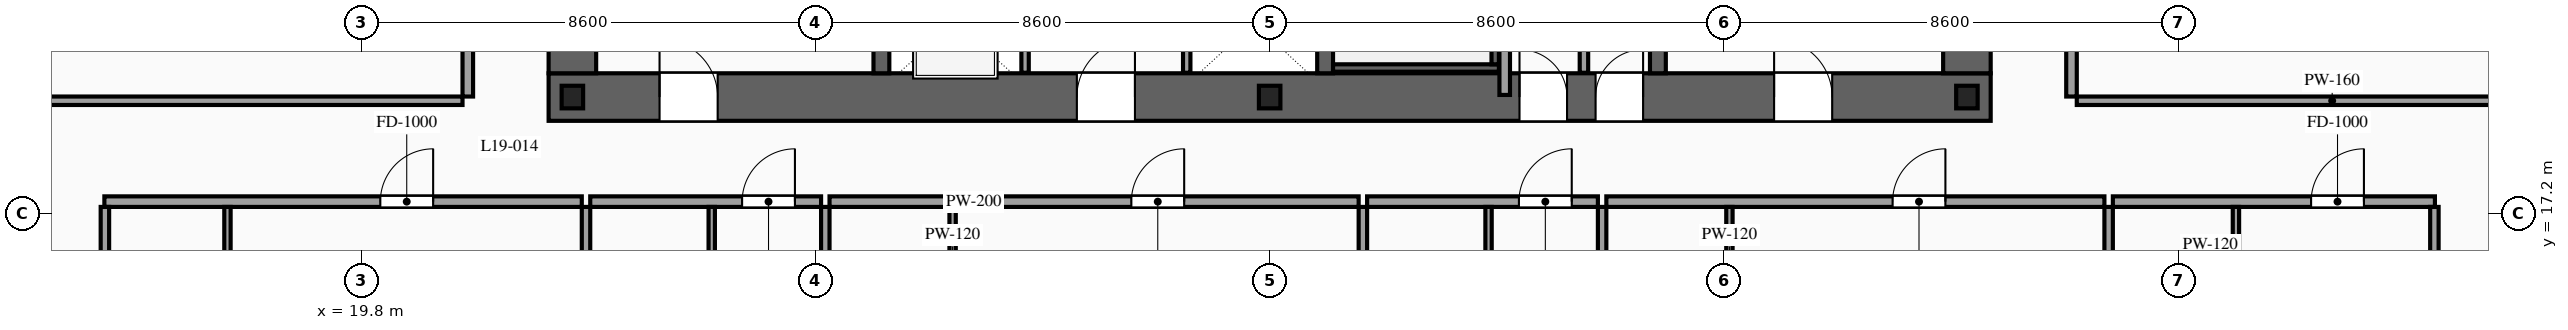
"""IFC4 building model, lengths in metres.
Left out: names, types, materials, properties, quantities, classifications, styles, units other than length and angle.
Written with IfcOpenShell. Run it as: python <this file> out.ifc"""

import sys

from ifc_helpers import new_model, si_unit, direction, frame, frame_2d, origin, origin_2d, place, context, subcontext, project, spatial, rectangle, i_section, extrude, source, transform, mapped, element, fill, save


model = new_model("IFC4")
c1 = context("Model", 3, precision=1e-05, world=origin(), true_north=direction((0.0, 1.0)))
c2 = subcontext(c1, "Body", "Model", "MODEL_VIEW")
j1 = project(units=[si_unit("LENGTHUNIT", "METRE"), si_unit("PLANEANGLEUNIT", "RADIAN")], contexts=[c1])
p1 = place(None, origin())
s1 = spatial("IfcSite", under=j1, at=p1, CompositionType="ELEMENT")
p2 = place(p1, origin())
s2 = spatial("IfcBuilding", under=s1, at=p2, CompositionType="ELEMENT")
p3 = place(p2, frame((0.0, 0.0, 74.8)))
s3 = spatial("IfcBuildingStorey", under=s2, at=p3, CompositionType="ELEMENT", Elevation=74.8)
p4 = place(p3, frame((23.35, 19.4, 0.0), z_axis=(0.0, 0.0, 1.0), x_axis=(1.0, 0.0, 0.0)))
e1 = element("IfcWall", 1, at=p4, inside=s3, PredefinedType="SHEAR", context=c2, shape_type="SweptSolid", body=[
    extrude(rectangle(XDim=27.3, YDim=0.9, at=frame_2d((13.65, 0.0))), origin(), (0.0, 0.0, 1.0), 3.6),
])
p5 = place(p4, frame((2.1, 0.0, 0.0)))
e2 = element("IfcOpeningElement", 2, at=p5, cuts=e1, PredefinedType="OPENING", context=c2, shape_type="SweptSolid", body=[
    extrude(rectangle(XDim=1.1, YDim=2.2, at=frame_2d((0.55, 1.1))), frame((0.0, 0.465, 0.0), z_axis=(0.0, -1.0, 0.0), x_axis=(1.0, 0.0, 0.0)), (0.0, 0.0, 1.0), 0.93),
])
p6 = place(p4, frame((10.0, 0.0, 0.0)))
e3 = element("IfcOpeningElement", 3, at=p6, cuts=e1, PredefinedType="OPENING", context=c2, shape_type="SweptSolid", body=[
    extrude(rectangle(XDim=1.1, YDim=2.2, at=frame_2d((0.55, 1.1))), frame((0.0, 0.465, 0.0), z_axis=(0.0, -1.0, 0.0), x_axis=(1.0, 0.0, 0.0)), (0.0, 0.0, 1.0), 0.93),
])
p7 = place(p4, frame((23.2, 0.0, 0.0)))
e4 = element("IfcOpeningElement", 4, at=p7, cuts=e1, PredefinedType="OPENING", context=c2, shape_type="SweptSolid", body=[
    extrude(rectangle(XDim=1.1, YDim=2.2, at=frame_2d((0.55, 1.1))), frame((0.0, 0.465, 0.0), z_axis=(0.0, -1.0, 0.0), x_axis=(1.0, 0.0, 0.0)), (0.0, 0.0, 1.0), 0.93),
])
p8 = place(p4, frame((19.82, 0.0, 0.0)))
e5 = element("IfcOpeningElement", 5, at=p8, cuts=e1, PredefinedType="OPENING", context=c2, shape_type="SweptSolid", body=[
    extrude(rectangle(XDim=0.9, YDim=2.15, at=frame_2d((0.45, 1.075))), frame((0.0, 0.465, 0.0), z_axis=(0.0, -1.0, 0.0), x_axis=(1.0, 0.0, 0.0)), (0.0, 0.0, 1.0), 0.93),
])
p9 = place(p4, frame((18.38, 0.0, 0.0)))
e6 = element("IfcOpeningElement", 6, at=p9, cuts=e1, PredefinedType="OPENING", context=c2, shape_type="SweptSolid", body=[
    extrude(rectangle(XDim=0.9, YDim=2.15, at=frame_2d((0.45, 1.075))), frame((0.0, 0.465, 0.0), z_axis=(0.0, -1.0, 0.0), x_axis=(1.0, 0.0, 0.0)), (0.0, 0.0, 1.0), 0.93),
])
m1 = source(origin(), c2, "Body", "SweptSolid", [
    extrude(rectangle(XDim=11.9, YDim=0.9, at=frame_2d((5.95, 0.0))), origin(), (0.0, 0.0, 1.0), 3.6),
])
for number, where, z_axis, x_axis in (
    (7, (23.8, 19.85, 0.0), (0.0, 0.0, 1.0), (0.0, 1.0, 0.0)),
    (8, (50.2, 19.85, 0.0), (0.0, 0.0, 1.0), (0.0, 1.0, 0.0)),
):
    element("IfcWall", number, at=place(p3, frame(where, z_axis=z_axis, x_axis=x_axis)), inside=s3, PredefinedType="SHEAR", context=c2, shape_type="MappedRepresentation", body=[
        mapped(m1, transform((0.0, 0.0, 0.0), scale=1.0)),
    ])
m2 = source(origin(), c2, "Body", "SweptSolid", [
    extrude(rectangle(XDim=11.9, YDim=0.3, at=frame_2d((5.95, 0.0))), origin(), (0.0, 0.0, 1.0), 3.6),
])
for number, where, z_axis, x_axis in (
    (9, (29.65, 19.85, 0.0), (0.0, 0.0, 1.0), (0.0, 1.0, 0.0)),
    (10, (38.05, 19.85, 0.0), (0.0, 0.0, 1.0), (0.0, 1.0, 0.0)),
    (11, (44.35, 19.85, 0.0), (0.0, 0.0, 1.0), (0.0, 1.0, 0.0)),
):
    element("IfcWall", number, at=place(p3, frame(where, z_axis=z_axis, x_axis=x_axis)), inside=s3, PredefinedType="SOLIDWALL", context=c2, shape_type="MappedRepresentation", body=[
        mapped(m2, transform((0.0, 0.0, 0.0), scale=1.0)),
    ])
m3 = source(origin(), c2, "Body", "SweptSolid", [
    extrude(i_section(OverallWidth=0.407, OverallDepth=0.428, WebThickness=0.02, FlangeThickness=0.035, at=origin_2d()), origin(), (0.0, 0.0, 1.0), 3.6),
])
for number, where, z_axis, x_axis in (
    (12, (23.8, 19.4, 0.0), (0.0, 0.0, 1.0), (1.0, 0.0, 0.0)),
    (13, (37.0, 19.4, 0.0), (0.0, 0.0, 1.0), (1.0, 0.0, 0.0)),
    (14, (50.2, 19.4, 0.0), (0.0, 0.0, 1.0), (1.0, 0.0, 0.0)),
):
    element("IfcColumn", number, at=place(p3, frame(where, z_axis=z_axis, x_axis=x_axis)), inside=s3, PredefinedType="COLUMN", context=c2, shape_type="MappedRepresentation", body=[
        mapped(m3, transform((0.0, 0.0, 0.0), scale=1.0)),
    ])
p10 = place(p3, frame((32.37, 19.86, 0.0), z_axis=(0.0, 0.0, 1.0), x_axis=(0.0, 1.0, 0.0)))
e15 = element("IfcWall", 15, at=p10, inside=s3, PredefinedType="SOLIDWALL", context=c2, shape_type="SweptSolid", body=[
    extrude(rectangle(XDim=2.04, YDim=0.14, at=frame_2d((1.02, 0.0))), origin(), (0.0, 0.0, 1.0), 3.38),
])
p11 = place(p10, frame((0.47, 0.0, 0.0)))
e16 = element("IfcOpeningElement", 16, at=p11, cuts=e15, PredefinedType="OPENING", context=c2, shape_type="SweptSolid", body=[
    extrude(rectangle(XDim=1.1, YDim=2.2, at=frame_2d((0.55, 1.1))), frame((0.0, 0.085, 0.0), z_axis=(0.0, -1.0, 0.0), x_axis=(1.0, 0.0, 0.0)), (0.0, 0.0, 1.0), 0.17),
])
m4 = source(origin(), c2, "Body", "SweptSolid", [
    extrude(rectangle(XDim=2.04, YDim=0.14, at=frame_2d((1.02, 0.0))), origin(), (0.0, 0.0, 1.0), 3.38),
])
p12 = place(p3, frame((35.43, 19.86, 0.0), z_axis=(0.0, 0.0, 1.0), x_axis=(0.0, 1.0, 0.0)))
e17 = element("IfcWall", 17, at=p12, inside=s3, PredefinedType="SOLIDWALL", context=c2, shape_type="MappedRepresentation", body=[
    mapped(m4, transform((0.0, 0.0, 0.0), scale=1.0)),
])
m5 = source(origin(), c2, "Body", "SweptSolid", [
    extrude(rectangle(XDim=3.14, YDim=0.14, at=frame_2d((1.57, 0.0))), origin(), (0.0, 0.0, 1.0), 3.38),
])
p13 = place(p3, frame((38.2, 19.95, 0.0), z_axis=(0.0, 0.0, 1.0), x_axis=(1.0, 0.0, 0.0)))
e18 = element("IfcWall", 18, at=p13, inside=s3, PredefinedType="SOLIDWALL", context=c2, shape_type="MappedRepresentation", body=[
    mapped(m5, transform((0.0, 0.0, 0.0), scale=1.0)),
])
m6 = source(origin(), c2, "Body", "SweptSolid", [
    extrude(rectangle(XDim=8.94, YDim=0.14, at=frame_2d((4.47, 0.0))), origin(), (0.0, 0.0, 1.0), 3.38),
])
p14 = place(p3, frame((41.27, 20.02, 0.0), z_axis=(0.0, 0.0, 1.0), x_axis=(0.0, 1.0, 0.0)))
e19 = element("IfcWall", 19, at=p14, inside=s3, PredefinedType="SOLIDWALL", context=c2, shape_type="MappedRepresentation", body=[
    mapped(m6, transform((0.0, 0.0, 0.0), scale=1.0)),
])
m7 = source(origin(), c2, "Body", "SweptSolid", [
    extrude(rectangle(XDim=1.34, YDim=0.16, at=frame_2d((0.67, 0.0))), origin(), (0.0, 0.0, 1.0), 3.38),
])
p15 = place(p3, frame((42.95, 19.86, 0.0), z_axis=(0.0, 0.0, 1.0), x_axis=(0.0, 1.0, 0.0)))
e20 = element("IfcWall", 20, at=p15, inside=s3, PredefinedType="PARTITIONING", context=c2, shape_type="MappedRepresentation", body=[
    mapped(m7, transform((0.0, 0.0, 0.0), scale=1.0)),
])
m8 = source(origin(), c2, "Body", "SweptSolid", [
    extrude(rectangle(XDim=6.51, YDim=0.2, at=frame_2d((3.255, 0.0))), origin(), (0.0, 0.0, 1.0), 3.38),
])
p16 = place(p3, frame((41.45, 19.44, 0.0), z_axis=(0.0, 0.0, 1.0), x_axis=(0.0, 1.0, 0.0)))
e21 = element("IfcWall", 21, at=p16, inside=s3, PredefinedType="PARTITIONING", context=c2, shape_type="MappedRepresentation", body=[
    mapped(m8, transform((0.0, 0.0, 0.0), scale=1.0)),
])
p17 = place(p3, frame((14.94, 17.42, 0.0), z_axis=(0.0, 0.0, 1.0), x_axis=(1.0, 0.0, 0.0)))
e22 = element("IfcWall", 22, at=p17, inside=s3, PredefinedType="PARTITIONING", context=c2, shape_type="SweptSolid", body=[
    extrude(rectangle(XDim=9.038, YDim=0.2, at=frame_2d((4.519, 0.0))), origin(), (0.0, 0.0, 1.0), 3.38),
])
p18 = place(p17, frame((5.224, 0.0, 0.0)))
e23 = element("IfcOpeningElement", 23, at=p18, cuts=e22, PredefinedType="OPENING", context=c2, shape_type="SweptSolid", body=[
    extrude(rectangle(XDim=1.0, YDim=2.2, at=frame_2d((0.5, 1.1))), frame((0.0, 0.115, 0.0), z_axis=(0.0, -1.0, 0.0), x_axis=(1.0, 0.0, 0.0)), (0.0, 0.0, 1.0), 0.23),
])
m9 = source(origin(), c2, "Body", "SweptSolid", [
    extrude(rectangle(XDim=16.47, YDim=0.16, at=frame_2d((8.235, 0.0))), origin(), (0.0, 0.0, 1.0), 3.38),
])
p19 = place(p3, frame((24.058, 0.85, 0.0), z_axis=(0.0, 0.0, 1.0), x_axis=(0.0, 1.0, 0.0)))
e24 = element("IfcWall", 24, at=p19, inside=s3, PredefinedType="PARTITIONING", context=c2, shape_type="MappedRepresentation", body=[
    mapped(m9, transform((0.0, 0.0, 0.0), scale=1.0)),
])
m10 = source(origin(), c2, "Body", "SweptSolid", [
    extrude(rectangle(XDim=2.42, YDim=0.12, at=frame_2d((1.21, 0.0))), origin(), (0.0, 0.0, 1.0), 3.38),
])
p20 = place(p3, frame((17.27, 14.9, 0.0), z_axis=(0.0, 0.0, 1.0), x_axis=(0.0, 1.0, 0.0)))
e25 = element("IfcWall", 25, at=p20, inside=s3, PredefinedType="PARTITIONING", context=c2, shape_type="MappedRepresentation", body=[
    mapped(m10, transform((0.0, 0.0, 0.0), scale=1.0)),
])
p21 = place(p3, frame((24.138, 17.42, 0.0), z_axis=(0.0, 0.0, 1.0), x_axis=(1.0, 0.0, 0.0)))
e26 = element("IfcWall", 26, at=p21, inside=s3, PredefinedType="PARTITIONING", context=c2, shape_type="SweptSolid", body=[
    extrude(rectangle(XDim=4.37, YDim=0.2, at=frame_2d((2.185, 0.0))), origin(), (0.0, 0.0, 1.0), 3.38),
])
p22 = place(p21, frame((2.875, 0.0, 0.0)))
e27 = element("IfcOpeningElement", 27, at=p22, cuts=e26, PredefinedType="OPENING", context=c2, shape_type="SweptSolid", body=[
    extrude(rectangle(XDim=1.0, YDim=2.2, at=frame_2d((0.5, 1.1))), frame((0.0, 0.115, 0.0), z_axis=(0.0, -1.0, 0.0), x_axis=(1.0, 0.0, 0.0)), (0.0, 0.0, 1.0), 0.23),
])
p23 = place(p3, frame((28.588, 0.85, 0.0), z_axis=(0.0, 0.0, 1.0), x_axis=(0.0, 1.0, 0.0)))
e28 = element("IfcWall", 28, at=p23, inside=s3, PredefinedType="PARTITIONING", context=c2, shape_type="MappedRepresentation", body=[
    mapped(m9, transform((0.0, 0.0, 0.0), scale=1.0)),
])
p24 = place(p3, frame((26.438, 14.9, 0.0), z_axis=(0.0, 0.0, 1.0), x_axis=(0.0, 1.0, 0.0)))
e29 = element("IfcWall", 29, at=p24, inside=s3, PredefinedType="PARTITIONING", context=c2, shape_type="MappedRepresentation", body=[
    mapped(m10, transform((0.0, 0.0, 0.0), scale=1.0)),
])
p25 = place(p3, frame((28.668, 17.42, 0.0), z_axis=(0.0, 0.0, 1.0), x_axis=(1.0, 0.0, 0.0)))
e30 = element("IfcWall", 30, at=p25, inside=s3, PredefinedType="PARTITIONING", context=c2, shape_type="SweptSolid", body=[
    extrude(rectangle(XDim=10.017, YDim=0.2, at=frame_2d((5.009, 0.0))), origin(), (0.0, 0.0, 1.0), 3.38),
])
p26 = place(p25, frame((5.714, 0.0, 0.0)))
e31 = element("IfcOpeningElement", 31, at=p26, cuts=e30, PredefinedType="OPENING", context=c2, shape_type="SweptSolid", body=[
    extrude(rectangle(XDim=1.0, YDim=2.2, at=frame_2d((0.5, 1.1))), frame((0.0, 0.115, 0.0), z_axis=(0.0, -1.0, 0.0), x_axis=(1.0, 0.0, 0.0)), (0.0, 0.0, 1.0), 0.23),
])
p27 = place(p3, frame((38.765, 0.85, 0.0), z_axis=(0.0, 0.0, 1.0), x_axis=(0.0, 1.0, 0.0)))
e32 = element("IfcWall", 32, at=p27, inside=s3, PredefinedType="PARTITIONING", context=c2, shape_type="MappedRepresentation", body=[
    mapped(m9, transform((0.0, 0.0, 0.0), scale=1.0)),
])
p28 = place(p3, frame((30.998, 14.9, 0.0), z_axis=(0.0, 0.0, 1.0), x_axis=(0.0, 1.0, 0.0)))
e33 = element("IfcWall", 33, at=p28, inside=s3, PredefinedType="PARTITIONING", context=c2, shape_type="MappedRepresentation", body=[
    mapped(m10, transform((0.0, 0.0, 0.0), scale=1.0)),
])
p29 = place(p3, frame((38.845, 17.42, 0.0), z_axis=(0.0, 0.0, 1.0), x_axis=(1.0, 0.0, 0.0)))
e34 = element("IfcWall", 34, at=p29, inside=s3, PredefinedType="PARTITIONING", context=c2, shape_type="SweptSolid", body=[
    extrude(rectangle(XDim=4.369, YDim=0.2, at=frame_2d((2.185, 0.0))), origin(), (0.0, 0.0, 1.0), 3.38),
])
p30 = place(p29, frame((2.874, 0.0, 0.0)))
e35 = element("IfcOpeningElement", 35, at=p30, cuts=e34, PredefinedType="OPENING", context=c2, shape_type="SweptSolid", body=[
    extrude(rectangle(XDim=1.0, YDim=2.2, at=frame_2d((0.5, 1.1))), frame((0.0, 0.115, 0.0), z_axis=(0.0, -1.0, 0.0), x_axis=(1.0, 0.0, 0.0)), (0.0, 0.0, 1.0), 0.23),
])
p31 = place(p3, frame((43.294, 0.85, 0.0), z_axis=(0.0, 0.0, 1.0), x_axis=(0.0, 1.0, 0.0)))
e36 = element("IfcWall", 36, at=p31, inside=s3, PredefinedType="PARTITIONING", context=c2, shape_type="MappedRepresentation", body=[
    mapped(m9, transform((0.0, 0.0, 0.0), scale=1.0)),
])
p32 = place(p3, frame((41.144, 14.9, 0.0), z_axis=(0.0, 0.0, 1.0), x_axis=(0.0, 1.0, 0.0)))
e37 = element("IfcWall", 37, at=p32, inside=s3, PredefinedType="PARTITIONING", context=c2, shape_type="MappedRepresentation", body=[
    mapped(m10, transform((0.0, 0.0, 0.0), scale=1.0)),
])
p33 = place(p3, frame((43.374, 17.42, 0.0), z_axis=(0.0, 0.0, 1.0), x_axis=(1.0, 0.0, 0.0)))
e38 = element("IfcWall", 38, at=p33, inside=s3, PredefinedType="PARTITIONING", context=c2, shape_type="SweptSolid", body=[
    extrude(rectangle(XDim=9.429, YDim=0.2, at=frame_2d((4.714, 0.0))), origin(), (0.0, 0.0, 1.0), 3.38),
])
p34 = place(p33, frame((5.419, 0.0, 0.0)))
e39 = element("IfcOpeningElement", 39, at=p34, cuts=e38, PredefinedType="OPENING", context=c2, shape_type="SweptSolid", body=[
    extrude(rectangle(XDim=1.0, YDim=2.2, at=frame_2d((0.5, 1.1))), frame((0.0, 0.115, 0.0), z_axis=(0.0, -1.0, 0.0), x_axis=(1.0, 0.0, 0.0)), (0.0, 0.0, 1.0), 0.23),
])
p35 = place(p3, frame((52.883, 0.85, 0.0), z_axis=(0.0, 0.0, 1.0), x_axis=(0.0, 1.0, 0.0)))
e40 = element("IfcWall", 40, at=p35, inside=s3, PredefinedType="PARTITIONING", context=c2, shape_type="MappedRepresentation", body=[
    mapped(m9, transform((0.0, 0.0, 0.0), scale=1.0)),
])
p36 = place(p3, frame((45.704, 14.9, 0.0), z_axis=(0.0, 0.0, 1.0), x_axis=(0.0, 1.0, 0.0)))
e41 = element("IfcWall", 41, at=p36, inside=s3, PredefinedType="PARTITIONING", context=c2, shape_type="MappedRepresentation", body=[
    mapped(m10, transform((0.0, 0.0, 0.0), scale=1.0)),
])
p37 = place(p3, frame((52.963, 17.42, 0.0), z_axis=(0.0, 0.0, 1.0), x_axis=(1.0, 0.0, 0.0)))
e42 = element("IfcWall", 42, at=p37, inside=s3, PredefinedType="PARTITIONING", context=c2, shape_type="SweptSolid", body=[
    extrude(rectangle(XDim=6.097, YDim=0.2, at=frame_2d((3.049, 0.0))), origin(), (0.0, 0.0, 1.0), 3.38),
])
p38 = place(p37, frame((3.753, 0.0, 0.0)))
e43 = element("IfcOpeningElement", 43, at=p38, cuts=e42, PredefinedType="OPENING", context=c2, shape_type="SweptSolid", body=[
    extrude(rectangle(XDim=1.0, YDim=2.2, at=frame_2d((0.5, 1.1))), frame((0.0, 0.115, 0.0), z_axis=(0.0, -1.0, 0.0), x_axis=(1.0, 0.0, 0.0)), (0.0, 0.0, 1.0), 0.23),
])
m11 = source(origin(), c2, "Body", "SweptSolid", [
    extrude(rectangle(XDim=16.32, YDim=0.16, at=frame_2d((8.16, 0.0))), origin(), (0.0, 0.0, 1.0), 3.38),
])
for number, where, z_axis, x_axis in (
    (44, (14.95, 1.0, 0.0), (0.0, 0.0, 1.0), (0.0, 1.0, 0.0)),
    (45, (59.05, 1.0, 0.0), (0.0, 0.0, 1.0), (0.0, 1.0, 0.0)),
):
    element("IfcWall", number, at=place(p3, frame(where, z_axis=z_axis, x_axis=x_axis)), inside=s3, PredefinedType="PARTITIONING", context=c2, shape_type="MappedRepresentation", body=[
        mapped(m11, transform((0.0, 0.0, 0.0), scale=1.0)),
    ])
p39 = place(p3, frame((55.293, 14.9, 0.0), z_axis=(0.0, 0.0, 1.0), x_axis=(0.0, 1.0, 0.0)))
e46 = element("IfcWall", 46, at=p39, inside=s3, PredefinedType="PARTITIONING", context=c2, shape_type="MappedRepresentation", body=[
    mapped(m10, transform((0.0, 0.0, 0.0), scale=1.0)),
])
p40 = place(p3, frame((21.82, 19.41, 0.0), z_axis=(0.0, 0.0, 1.0), x_axis=(0.0, 1.0, 0.0)))
e47 = element("IfcWall", 47, at=p40, inside=s3, PredefinedType="PARTITIONING", context=c2, shape_type="SweptSolid", body=[
    extrude(rectangle(XDim=6.31, YDim=0.2, at=frame_2d((3.155, 0.0))), origin(), (0.0, 0.0, 1.0), 3.38),
])
p41 = place(p40, frame((2.655, 0.0, 0.0)))
e48 = element("IfcOpeningElement", 48, at=p41, cuts=e47, PredefinedType="OPENING", context=c2, shape_type="SweptSolid", body=[
    extrude(rectangle(XDim=1.0, YDim=2.2, at=frame_2d((0.5, 1.1))), frame((0.0, 0.115, 0.0), z_axis=(0.0, -1.0, 0.0), x_axis=(1.0, 0.0, 0.0)), (0.0, 0.0, 1.0), 0.23),
])
m12 = source(origin(), c2, "Body", "SweptSolid", [
    extrude(rectangle(XDim=9.67, YDim=0.16, at=frame_2d((4.835, 0.0))), origin(), (0.0, 0.0, 1.0), 2.875),
])
p42 = place(p3, frame((12.05, 19.33, 0.0), z_axis=(0.0, 0.0, 1.0), x_axis=(1.0, 0.0, 0.0)))
e49 = element("IfcWall", 49, at=p42, inside=s3, PredefinedType="PARTITIONING", context=c2, shape_type="MappedRepresentation", body=[
    mapped(m12, transform((0.0, 0.0, 0.0), scale=1.0)),
])
p43 = place(p3, frame((52.18, 19.41, 0.0), z_axis=(0.0, 0.0, 1.0), x_axis=(0.0, 1.0, 0.0)))
e50 = element("IfcWall", 50, at=p43, inside=s3, PredefinedType="PARTITIONING", context=c2, shape_type="SweptSolid", body=[
    extrude(rectangle(XDim=6.31, YDim=0.2, at=frame_2d((3.155, 0.0))), origin(), (0.0, 0.0, 1.0), 3.38),
])
p44 = place(p43, frame((2.655, 0.0, 0.0)))
e51 = element("IfcOpeningElement", 51, at=p44, cuts=e50, PredefinedType="OPENING", context=c2, shape_type="SweptSolid", body=[
    extrude(rectangle(XDim=1.0, YDim=2.2, at=frame_2d((0.5, 1.1))), frame((0.0, 0.115, 0.0), z_axis=(0.0, -1.0, 0.0), x_axis=(1.0, 0.0, 0.0)), (0.0, 0.0, 1.0), 0.23),
])
p45 = place(p3, frame((52.28, 19.33, 0.0), z_axis=(0.0, 0.0, 1.0), x_axis=(1.0, 0.0, 0.0)))
e52 = element("IfcWall", 52, at=p45, inside=s3, PredefinedType="PARTITIONING", context=c2, shape_type="MappedRepresentation", body=[
    mapped(m12, transform((0.0, 0.0, 0.0), scale=1.0)),
])
m13 = source(origin(), c2, "Body", "SweptSolid", [
    extrude(rectangle(XDim=1.1, YDim=2.2, at=frame_2d((0.55, 1.1))), frame((0.0, 0.025, 0.0), z_axis=(0.0, -1.0, 0.0), x_axis=(1.0, 0.0, 0.0)), (0.0, 0.0, 1.0), 0.05),
])
p46 = place(p5, origin())
e53 = element("IfcDoor", 53, at=p46, inside=s3, OperationType="SINGLE_SWING_LEFT", PredefinedType="DOOR", context=c2, shape_type="MappedRepresentation", body=[
    mapped(m13, transform((0.0, 0.0, 0.0), scale=1.0)),
])
fill(e2, e53)
p47 = place(p6, origin())
e54 = element("IfcDoor", 54, at=p47, inside=s3, OperationType="SINGLE_SWING_RIGHT", PredefinedType="DOOR", context=c2, shape_type="MappedRepresentation", body=[
    mapped(m13, transform((0.0, 0.0, 0.0), scale=1.0)),
])
fill(e3, e54)
p48 = place(p7, origin())
e55 = element("IfcDoor", 55, at=p48, inside=s3, OperationType="SINGLE_SWING_LEFT", PredefinedType="DOOR", context=c2, shape_type="MappedRepresentation", body=[
    mapped(m13, transform((0.0, 0.0, 0.0), scale=1.0)),
])
fill(e4, e55)
m14 = source(origin(), c2, "Body", "SweptSolid", [
    extrude(rectangle(XDim=0.9, YDim=2.15, at=frame_2d((0.45, 1.075))), frame((0.0, 0.025, 0.0), z_axis=(0.0, -1.0, 0.0), x_axis=(1.0, 0.0, 0.0)), (0.0, 0.0, 1.0), 0.05),
])
p49 = place(p8, origin())
e56 = element("IfcDoor", 56, at=p49, inside=s3, OperationType="SINGLE_SWING_RIGHT", PredefinedType="DOOR", context=c2, shape_type="MappedRepresentation", body=[
    mapped(m14, transform((0.0, 0.0, 0.0), scale=1.0)),
])
fill(e5, e56)
p50 = place(p9, origin())
e57 = element("IfcDoor", 57, at=p50, inside=s3, OperationType="SINGLE_SWING_LEFT", PredefinedType="DOOR", context=c2, shape_type="MappedRepresentation", body=[
    mapped(m14, transform((0.0, 0.0, 0.0), scale=1.0)),
])
fill(e6, e57)
m15 = source(origin(), c2, "Body", "SweptSolid", [
    extrude(rectangle(XDim=1.0, YDim=2.2, at=frame_2d((0.5, 1.1))), frame((0.0, 0.025, 0.0), z_axis=(0.0, -1.0, 0.0), x_axis=(1.0, 0.0, 0.0)), (0.0, 0.0, 1.0), 0.05),
])
p51 = place(p18, origin())
e58 = element("IfcDoor", 58, at=p51, inside=s3, OperationType="SINGLE_SWING_RIGHT", PredefinedType="DOOR", context=c2, shape_type="MappedRepresentation", body=[
    mapped(m15, transform((0.0, 0.0, 0.0), scale=1.0)),
])
fill(e23, e58)
p52 = place(p22, origin())
e59 = element("IfcDoor", 59, at=p52, inside=s3, OperationType="SINGLE_SWING_RIGHT", PredefinedType="DOOR", context=c2, shape_type="MappedRepresentation", body=[
    mapped(m15, transform((0.0, 0.0, 0.0), scale=1.0)),
])
fill(e27, e59)
p53 = place(p26, origin())
e60 = element("IfcDoor", 60, at=p53, inside=s3, OperationType="SINGLE_SWING_RIGHT", PredefinedType="DOOR", context=c2, shape_type="MappedRepresentation", body=[
    mapped(m15, transform((0.0, 0.0, 0.0), scale=1.0)),
])
fill(e31, e60)
p54 = place(p30, origin())
e61 = element("IfcDoor", 61, at=p54, inside=s3, OperationType="SINGLE_SWING_RIGHT", PredefinedType="DOOR", context=c2, shape_type="MappedRepresentation", body=[
    mapped(m15, transform((0.0, 0.0, 0.0), scale=1.0)),
])
fill(e35, e61)
p55 = place(p34, origin())
e62 = element("IfcDoor", 62, at=p55, inside=s3, OperationType="SINGLE_SWING_RIGHT", PredefinedType="DOOR", context=c2, shape_type="MappedRepresentation", body=[
    mapped(m15, transform((0.0, 0.0, 0.0), scale=1.0)),
])
fill(e39, e62)
p56 = place(p38, origin())
e63 = element("IfcDoor", 63, at=p56, inside=s3, OperationType="SINGLE_SWING_RIGHT", PredefinedType="DOOR", context=c2, shape_type="MappedRepresentation", body=[
    mapped(m15, transform((0.0, 0.0, 0.0), scale=1.0)),
])
fill(e43, e63)
save(model, sys.argv[1])
